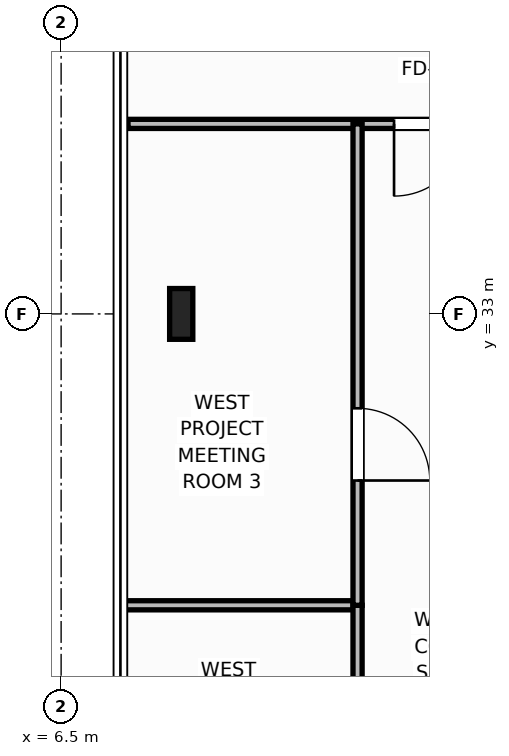
"""IFC4 building model, lengths in metres.
Left out: names, types, materials, properties, quantities, classifications, styles, units other than length and angle.
Written with IfcOpenShell. Run it as: python <this file> out.ifc"""

import sys

from ifc_helpers import new_model, si_unit, direction, frame, frame_2d, origin, origin_2d, place, context, subcontext, project, spatial, rectangle, i_section, extrude, element, fill, save


model = new_model("IFC4")
c1 = context("Model", 3, precision=1e-05, world=origin(), true_north=direction((0.0, 1.0)))
c2 = subcontext(c1, "Body", "Model", "MODEL_VIEW")
j1 = project(units=[si_unit("LENGTHUNIT", "METRE"), si_unit("PLANEANGLEUNIT", "RADIAN")], contexts=[c1])
p1 = place(None, origin())
s1 = spatial("IfcSite", under=j1, at=p1, CompositionType="ELEMENT")
p2 = place(p1, origin())
s2 = spatial("IfcBuilding", under=s1, at=p2, CompositionType="ELEMENT")
p3 = place(p2, frame((0.0, 0.0, 298.4)))
s3 = spatial("IfcBuildingStorey", under=s2, at=p3, CompositionType="ELEMENT", Elevation=298.4)
p4 = place(p3, frame((8.08, 33.0, 0.0), z_axis=(0.0, 0.0, 1.0), x_axis=(1.0, 0.0, 0.0)))
e1 = element("IfcColumn", 1, at=p4, inside=s3, PredefinedType="COLUMN", context=c2, shape_type="SweptSolid", body=[
    extrude(i_section(OverallWidth=0.305, OverallDepth=0.668, WebThickness=0.021, FlangeThickness=0.04, at=origin_2d()), origin(), (0.0, 0.0, 1.0), 4.0),
])
p5 = place(p3, frame((7.38, 35.5, 0.0), z_axis=(0.0, 0.0, 1.0), x_axis=(1.0, 0.0, 0.0)))
e2 = element("IfcWall", 2, at=p5, inside=s3, PredefinedType="PARTITIONING", context=c2, shape_type="SweptSolid", body=[
    extrude(rectangle(XDim=5.912, YDim=0.12, at=frame_2d((2.956, 0.0))), origin(), (0.0, 0.0, 1.0), 3.788),
])
p6 = place(p5, frame((3.5, 0.0, 0.0)))
e3 = element("IfcOpeningElement", 3, at=p6, cuts=e2, PredefinedType="OPENING", context=c2, shape_type="SweptSolid", body=[
    extrude(rectangle(XDim=0.95, YDim=2.15, at=frame_2d((0.475, 1.075))), frame((0.0, 0.07, 0.0), z_axis=(0.0, -1.0, 0.0), x_axis=(1.0, 0.0, 0.0)), (0.0, 0.0, 1.0), 0.14),
])
p7 = place(p3, frame((7.22, 29.167, 0.0), z_axis=(0.0, 0.0, 1.0), x_axis=(1.0, 0.0, 0.0)))
e4 = element("IfcWall", 4, at=p7, inside=s3, PredefinedType="PARTITIONING", context=c2, shape_type="SweptSolid", body=[
    extrude(rectangle(XDim=3.18, YDim=0.12, at=frame_2d((1.59, 0.0))), origin(), (0.0, 0.0, 1.0), 3.788),
])
p8 = place(p3, frame((10.4, 22.833, 0.0), z_axis=(0.0, 0.0, 1.0), x_axis=(0.0, 1.0, 0.0)))
e5 = element("IfcWall", 5, at=p8, inside=s3, PredefinedType="PARTITIONING", context=c2, shape_type="SweptSolid", body=[
    extrude(rectangle(XDim=6.333, YDim=0.12, at=frame_2d((3.167, 0.0))), origin(), (0.0, 0.0, 1.0), 3.788),
])
p9 = place(p8, frame((2.692, 0.0, 0.0)))
e6 = element("IfcOpeningElement", 6, at=p9, cuts=e5, PredefinedType="OPENING", context=c2, shape_type="SweptSolid", body=[
    extrude(rectangle(XDim=0.95, YDim=2.15, at=frame_2d((0.475, 1.075))), frame((0.0, 0.07, 0.0), z_axis=(0.0, -1.0, 0.0), x_axis=(1.0, 0.0, 0.0)), (0.0, 0.0, 1.0), 0.14),
])
p10 = place(p3, frame((10.4, 29.167, 0.0), z_axis=(0.0, 0.0, 1.0), x_axis=(0.0, 1.0, 0.0)))
e7 = element("IfcWall", 7, at=p10, inside=s3, PredefinedType="PARTITIONING", context=c2, shape_type="SweptSolid", body=[
    extrude(rectangle(XDim=6.333, YDim=0.12, at=frame_2d((3.167, 0.0))), origin(), (0.0, 0.0, 1.0), 3.788),
])
p11 = place(p10, frame((1.642, 0.0, 0.0)))
e8 = element("IfcOpeningElement", 8, at=p11, cuts=e7, PredefinedType="OPENING", context=c2, shape_type="SweptSolid", body=[
    extrude(rectangle(XDim=0.95, YDim=2.15, at=frame_2d((0.475, 1.075))), frame((0.0, 0.07, 0.0), z_axis=(0.0, -1.0, 0.0), x_axis=(1.0, 0.0, 0.0)), (0.0, 0.0, 1.0), 0.14),
])
p12 = place(p6, origin())
e9 = element("IfcDoor", 9, at=p12, inside=s3, OperationType="SINGLE_SWING_RIGHT", PredefinedType="DOOR", context=c2, shape_type="SweptSolid", body=[
    extrude(rectangle(XDim=0.95, YDim=2.15, at=frame_2d((0.475, 1.075))), frame((0.0, 0.025, 0.0), z_axis=(0.0, -1.0, 0.0), x_axis=(1.0, 0.0, 0.0)), (0.0, 0.0, 1.0), 0.05),
])
fill(e3, e9)
p13 = place(p11, origin())
e10 = element("IfcDoor", 10, at=p13, inside=s3, OperationType="SINGLE_SWING_RIGHT", PredefinedType="DOOR", context=c2, shape_type="SweptSolid", body=[
    extrude(rectangle(XDim=0.95, YDim=2.15, at=frame_2d((0.475, 1.075))), frame((0.0, 0.025, 0.0), z_axis=(0.0, -1.0, 0.0), x_axis=(1.0, 0.0, 0.0)), (0.0, 0.0, 1.0), 0.05),
])
fill(e8, e10)
save(model, sys.argv[1])
